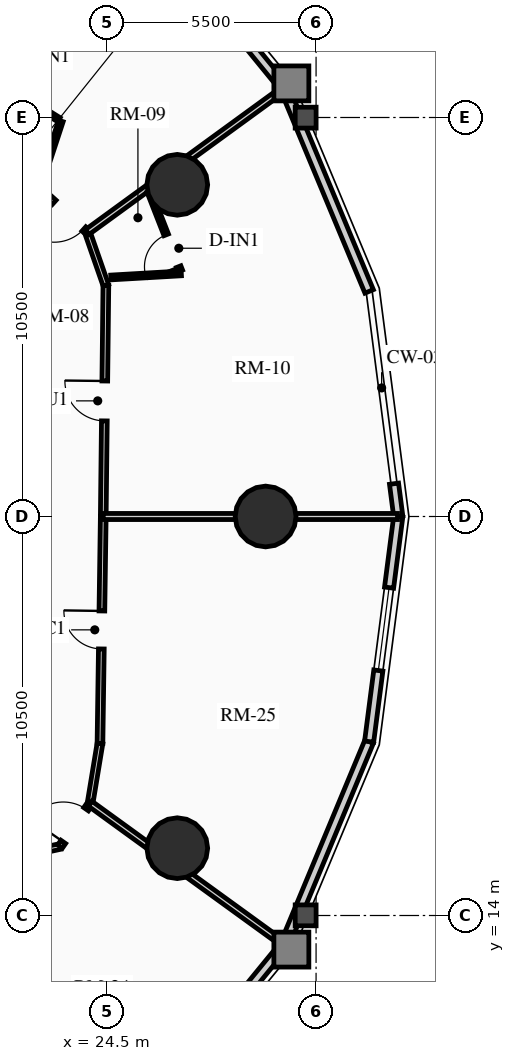
"""IFC4 building model, lengths in metres.
Left out: names, types, materials, properties, quantities, classifications, styles, units other than length and angle.
Written with IfcOpenShell. Run it as: python <this file> out.ifc"""

import sys

from ifc_helpers import new_model, si_unit, direction, frame, frame_2d, origin, origin_2d, place, context, subcontext, project, spatial, rectangle, circle, extrude, source, transform, mapped, element, fill, save


model = new_model("IFC4")
c1 = context("Model", 3, precision=1e-05, world=origin(), true_north=direction((0.0, 1.0)))
c2 = subcontext(c1, "Body", "Model", "MODEL_VIEW")
j1 = project(units=[si_unit("LENGTHUNIT", "METRE"), si_unit("PLANEANGLEUNIT", "RADIAN")], contexts=[c1])
p1 = place(None, origin())
s1 = spatial("IfcSite", under=j1, at=p1, CompositionType="ELEMENT")
p2 = place(p1, origin())
s2 = spatial("IfcBuilding", under=s1, at=p2, CompositionType="ELEMENT")
p3 = place(p2, frame((0.0, 0.0, 48.19)))
s3 = spatial("IfcBuildingStorey", under=s2, at=p3, CompositionType="ELEMENT", Elevation=48.19)
for number, where, z_axis, x_axis in (
    (1, (28.672, 24.5, 0.0), (0.0, 0.0, 1.0), (1.0, 0.0, 0.0)),
    (2, (26.347, 33.229, 0.0), (0.0, 0.0, 1.0), (1.0, 0.0, 0.0)),
    (3, (26.347, 15.771, 0.0), (0.0, 0.0, 1.0), (1.0, 0.0, 0.0)),
):
    element("IfcColumn", number, at=place(p3, frame(where, z_axis=z_axis, x_axis=x_axis)), inside=s3, PredefinedType="USERDEFINED", context=c2, shape_type="SweptSolid", body=[
        extrude(circle(Radius=0.8, at=origin_2d()), origin(), (0.0, 0.0, 1.0), 2.91),
    ])
p4 = place(p3, frame((32.051, 25.363, 0.0), z_axis=(0.0, 0.0, 1.0), x_axis=(0.128523364007, -0.991706481225, 0.0)))
e4 = element("IfcWall", 4, at=p4, inside=s3, PredefinedType="SOLIDWALL", context=c2, shape_type="SweptSolid", body=[
    extrude(rectangle(XDim=0.87, YDim=0.24, at=frame_2d((0.435, 0.0))), origin(), (0.0, 0.0, 1.0), 2.635),
])
p5 = place(p3, frame((29.172, 35.768, 0.0), z_axis=(0.0, 0.0, 1.0), x_axis=(0.384348836956, -0.923187939442, 0.0)))
e5 = element("IfcWall", 5, at=p5, inside=s3, PredefinedType="SOLIDWALL", context=c2, shape_type="SweptSolid", body=[
    extrude(rectangle(XDim=5.789, YDim=0.24, at=frame_2d((2.894, 0.0))), origin(), (0.0, 0.0, 1.0), 2.073),
])
p6 = place(p3, frame((25.707, 40.009, 0.0), z_axis=(0.0, 0.0, 1.0), x_axis=(0.632713287022, -0.77438614168, 0.0)))
e6 = element("IfcWall", 6, at=p6, inside=s3, PredefinedType="SOLIDWALL", context=c2, shape_type="SweptSolid", body=[
    extrude(rectangle(XDim=5.477, YDim=0.24, at=frame_2d((2.738, 0.0))), origin(), (0.0, 0.0, 1.0), 2.073),
])
m1 = source(origin(), c2, "Body", "SweptSolid", [
    extrude(rectangle(XDim=1.9, YDim=1.35, at=frame_2d((0.95, 0.675))), frame((0.0, 0.13, 0.0), z_axis=(0.0, -1.0, 0.0), x_axis=(1.0, 0.0, 0.0)), (0.0, 0.0, 1.0), 0.26),
])
p7 = place(p6, frame((1.788, 0.0, 0.65)))
e7 = element("IfcOpeningElement", 7, at=p7, cuts=e6, PredefinedType="OPENING", context=c2, shape_type="MappedRepresentation", body=[
    mapped(m1, transform((0.0, 0.0, 0.0), x_axis=(1.0, 0.0, 0.0), y_axis=(0.0, 1.0, 0.0), z_axis=(0.0, 0.0, 1.0), scale=1.0)),
])
p8 = place(p3, frame((29.172, 13.232, 0.0), z_axis=(0.0, 0.0, 1.0), x_axis=(-0.632713287022, -0.77438614168, 0.0)))
e8 = element("IfcWall", 8, at=p8, inside=s3, PredefinedType="SOLIDWALL", context=c2, shape_type="SweptSolid", body=[
    extrude(rectangle(XDim=5.477, YDim=0.24, at=frame_2d((2.738, 0.0))), origin(), (0.0, 0.0, 1.0), 2.073),
])
p9 = place(p8, frame((1.788, 0.0, 0.65)))
e9 = element("IfcOpeningElement", 9, at=p9, cuts=e8, PredefinedType="OPENING", context=c2, shape_type="MappedRepresentation", body=[
    mapped(m1, transform((0.0, 0.0, 0.0), x_axis=(1.0, 0.0, 0.0), y_axis=(0.0, 1.0, 0.0), z_axis=(0.0, 0.0, 1.0), scale=1.0)),
])
p10 = place(p3, frame((31.396, 18.576, 0.0), z_axis=(0.0, 0.0, 1.0), x_axis=(-0.384348836956, -0.923187939442, 0.0)))
e10 = element("IfcWall", 10, at=p10, inside=s3, PredefinedType="SOLIDWALL", context=c2, shape_type="SweptSolid", body=[
    extrude(rectangle(XDim=5.789, YDim=0.24, at=frame_2d((2.894, 0.0))), origin(), (0.0, 0.0, 1.0), 2.073),
])
p11 = place(p3, frame((32.163, 24.5, 0.0), z_axis=(0.0, 0.0, 1.0), x_axis=(-0.128339641463, -0.991730274031, 0.0)))
e11 = element("IfcWall", 11, at=p11, inside=s3, PredefinedType="SOLIDWALL", context=c2, shape_type="SweptSolid", body=[
    extrude(rectangle(XDim=5.973, YDim=0.24, at=frame_2d((2.987, 0.0))), origin(), (0.0, 0.0, 1.0), 2.073),
])
m2 = source(origin(), c2, "Body", "SweptSolid", [
    extrude(rectangle(XDim=2.2, YDim=1.35, at=frame_2d((1.1, 0.675))), frame((0.0, 0.13, 0.0), z_axis=(0.0, -1.0, 0.0), x_axis=(1.0, 0.0, 0.0)), (0.0, 0.0, 1.0), 0.26),
])
p12 = place(p11, frame((1.887, 0.0, 0.65)))
e12 = element("IfcOpeningElement", 12, at=p12, cuts=e11, PredefinedType="OPENING", context=c2, shape_type="MappedRepresentation", body=[
    mapped(m2, transform((0.0, 0.0, 0.0), x_axis=(1.0, 0.0, 0.0), y_axis=(0.0, 1.0, 0.0), z_axis=(0.0, 0.0, 1.0), scale=1.0)),
])
p13 = place(p3, frame((24.4, 24.5, 0.0), z_axis=(0.0, 0.0, 1.0), x_axis=(0.011359710161, 0.999935476411, 0.0)))
e13 = element("IfcWall", 13, at=p13, inside=s3, PredefinedType="PARTITIONING", context=c2, shape_type="SweptSolid", body=[
    extrude(rectangle(XDim=6.082, YDim=0.15, at=frame_2d((3.041, 0.0))), origin(), (0.0, 0.0, 1.0), 2.159),
])
m3 = source(origin(), c2, "Body", "SweptSolid", [
    extrude(rectangle(XDim=1.05, YDim=2.015, at=frame_2d((0.525, 1.007))), frame((0.0, 0.085, 0.0), z_axis=(0.0, -1.0, 0.0), x_axis=(1.0, 0.0, 0.0)), (0.0, 0.0, 1.0), 0.17),
])
p14 = place(p13, frame((2.516, 0.0, 0.0)))
e14 = element("IfcOpeningElement", 14, at=p14, cuts=e13, PredefinedType="OPENING", context=c2, shape_type="MappedRepresentation", body=[
    mapped(m3, transform((0.0, 0.0, 0.0), x_axis=(1.0, 0.0, 0.0), y_axis=(0.0, 1.0, 0.0), z_axis=(0.0, 0.0, 1.0), scale=1.0)),
])
p15 = place(p3, frame((24.469, 30.582, 0.0), z_axis=(0.0, 0.0, 1.0), x_axis=(-0.328902536986, 0.944363871166, 0.0)))
e15 = element("IfcWall", 15, at=p15, inside=s3, PredefinedType="PARTITIONING", context=c2, shape_type="SweptSolid", body=[
    extrude(rectangle(XDim=1.488, YDim=0.15, at=frame_2d((0.744, 0.0))), origin(), (0.0, 0.0, 1.0), 2.205),
])
p16 = place(p3, frame((23.98, 31.987, 0.0), z_axis=(0.0, 0.0, 1.0), x_axis=(-0.744317922268, 0.667825449193, 0.0)))
e16 = element("IfcWall", 16, at=p16, inside=s3, PredefinedType="PARTITIONING", context=c2, shape_type="SweptSolid", body=[
    extrude(rectangle(XDim=1.481, YDim=0.15, at=frame_2d((0.74, 0.0))), origin(), (0.0, 0.0, 1.0), 2.159),
])
p17 = place(p16, frame((0.12, 0.0, 0.0)))
e17 = element("IfcOpeningElement", 17, at=p17, cuts=e16, PredefinedType="OPENING", context=c2, shape_type="MappedRepresentation", body=[
    mapped(m3, transform((0.0, 0.0, 0.0), x_axis=(1.0, 0.0, 0.0), y_axis=(0.0, 1.0, 0.0), z_axis=(0.0, 0.0, 1.0), scale=1.0)),
])
p18 = place(p3, frame((21.419, 15.418, 0.0), z_axis=(0.0, 0.0, 1.0), x_axis=(0.977540384091, 0.210748184977, 0.0)))
e18 = element("IfcWall", 18, at=p18, inside=s3, PredefinedType="PARTITIONING", context=c2, shape_type="SweptSolid", body=[
    extrude(rectangle(XDim=1.887, YDim=0.15, at=frame_2d((0.944, 0.0))), origin(), (0.0, 0.0, 1.0), 2.205),
])
p19 = place(p3, frame((23.263, 15.816, 0.0), z_axis=(0.0, 0.0, 1.0), x_axis=(0.572652947117, 0.819797903241, 0.0)))
e19 = element("IfcWall", 19, at=p19, inside=s3, PredefinedType="PARTITIONING", context=c2, shape_type="SweptSolid", body=[
    extrude(rectangle(XDim=1.377, YDim=0.15, at=frame_2d((0.688, 0.0))), origin(), (0.0, 0.0, 1.0), 2.159),
])
p20 = place(p19, frame((0.147, 0.0, 0.0)))
e20 = element("IfcOpeningElement", 20, at=p20, cuts=e19, PredefinedType="OPENING", context=c2, shape_type="MappedRepresentation", body=[
    mapped(m3, transform((0.0, 0.0, 0.0), x_axis=(1.0, 0.0, 0.0), y_axis=(0.0, 1.0, 0.0), z_axis=(0.0, 0.0, 1.0), scale=1.0)),
])
p21 = place(p3, frame((24.052, 16.945, 0.0), z_axis=(0.0, 0.0, 1.0), x_axis=(0.162869842843, 0.986647563364, 0.0)))
e21 = element("IfcWall", 21, at=p21, inside=s3, PredefinedType="PARTITIONING", context=c2, shape_type="SweptSolid", body=[
    extrude(rectangle(XDim=1.605, YDim=0.15, at=frame_2d((0.803, 0.0))), origin(), (0.0, 0.0, 1.0), 2.205),
])
p22 = place(p3, frame((24.313, 18.529, 0.0), z_axis=(0.0, 0.0, 1.0), x_axis=(0.014472275982, 0.99989527113, 0.0)))
e22 = element("IfcWall", 22, at=p22, inside=s3, PredefinedType="PARTITIONING", context=c2, shape_type="SweptSolid", body=[
    extrude(rectangle(XDim=5.972, YDim=0.15, at=frame_2d((2.986, 0.0))), origin(), (0.0, 0.0, 1.0), 2.635),
])
m4 = source(origin(), c2, "Body", "SweptSolid", [
    extrude(rectangle(XDim=1.0, YDim=2.015, at=frame_2d((0.5, 1.007))), frame((0.0, 0.085, 0.0), z_axis=(0.0, -1.0, 0.0), x_axis=(1.0, 0.0, 0.0)), (0.0, 0.0, 1.0), 0.17),
])
p23 = place(p22, frame((2.486, 0.0, 0.0)))
e23 = element("IfcOpeningElement", 23, at=p23, cuts=e22, PredefinedType="OPENING", context=c2, shape_type="MappedRepresentation", body=[
    mapped(m4, transform((0.0, 0.0, 0.0), x_axis=(1.0, 0.0, 0.0), y_axis=(0.0, 1.0, 0.0), z_axis=(0.0, 0.0, 1.0), scale=1.0)),
])
p24 = place(p3, frame((24.4, 24.5, 0.0), z_axis=(0.0, 0.0, 1.0), x_axis=(1.0, 0.0, 0.0)))
e24 = element("IfcWall", 24, at=p24, inside=s3, PredefinedType="PARTITIONING", context=c2, shape_type="SweptSolid", body=[
    extrude(rectangle(XDim=7.743, YDim=0.16, at=frame_2d((3.872, 0.0))), origin(), (0.0, 0.0, 1.0), 2.073),
])
p25 = place(p3, frame((23.98, 31.987, 0.0), z_axis=(0.0, 0.0, 1.0), x_axis=(0.80834018144, 0.588715679313, 0.0)))
e25 = element("IfcWall", 25, at=p25, inside=s3, PredefinedType="PARTITIONING", context=c2, shape_type="SweptSolid", body=[
    extrude(rectangle(XDim=6.403, YDim=0.16, at=frame_2d((3.202, 0.0))), origin(), (0.0, 0.0, 1.0), 2.073),
])
p26 = place(p3, frame((24.052, 16.945, 0.0), z_axis=(0.0, 0.0, 1.0), x_axis=(0.809544185493, -0.587058950817, 0.0)))
e26 = element("IfcWall", 26, at=p26, inside=s3, PredefinedType="PARTITIONING", context=c2, shape_type="SweptSolid", body=[
    extrude(rectangle(XDim=6.304, YDim=0.16, at=frame_2d((3.152, 0.0))), origin(), (0.0, 0.0, 1.0), 2.073),
])
p27 = place(p3, frame((24.601, 30.79, 0.0), z_axis=(0.0, 0.0, 1.0), x_axis=(0.998323904123, 0.057873849514, 0.0)))
e27 = element("IfcWall", 27, at=p27, inside=s3, PredefinedType="PARTITIONING", context=c2, shape_type="SweptSolid", body=[
    extrude(rectangle(XDim=1.856, YDim=0.125, at=frame_2d((0.928, 0.0))), origin(), (0.0, 0.0, 1.0), 2.205),
])
p28 = place(p3, frame((26.428, 30.963, 0.0), z_axis=(0.0, 0.0, 1.0), x_axis=(-0.364149471566, 0.931340519014, 0.0)))
e28 = element("IfcWall", 28, at=p28, inside=s3, PredefinedType="PARTITIONING", context=c2, shape_type="SweptSolid", body=[
    extrude(rectangle(XDim=2.247, YDim=0.125, at=frame_2d((1.124, 0.0))), origin(), (0.0, 0.0, 1.0), 2.159),
])
m5 = source(origin(), c2, "Body", "SweptSolid", [
    extrude(rectangle(XDim=0.9, YDim=2.005, at=frame_2d((0.45, 1.002))), frame((0.0, 0.073, 0.0), z_axis=(0.0, -1.0, 0.0), x_axis=(1.0, 0.0, 0.0)), (0.0, 0.0, 1.0), 0.145),
])
p29 = place(p28, frame((0.12, 0.0, 0.0)))
e29 = element("IfcOpeningElement", 29, at=p29, cuts=e28, PredefinedType="OPENING", context=c2, shape_type="MappedRepresentation", body=[
    mapped(m5, transform((0.0, 0.0, 0.0), x_axis=(1.0, 0.0, 0.0), y_axis=(0.0, 1.0, 0.0), z_axis=(0.0, 0.0, 1.0), scale=1.0)),
])
p30 = place(p3, frame((22.76, 33.313, 0.0), z_axis=(0.0, 0.0, 1.0), x_axis=(0.312649886595, 0.949868437423, 0.0)))
e30 = element("IfcWall", 30, at=p30, inside=s3, PredefinedType="PARTITIONING", context=c2, shape_type="SweptSolid", body=[
    extrude(rectangle(XDim=1.68, YDim=0.125, at=frame_2d((0.84, 0.0))), origin(), (0.0, 0.0, 1.0), 2.205),
])
p31 = place(p3, frame((23.233, 34.941, 0.0), z_axis=(0.0, 0.0, 1.0), x_axis=(-0.84760373009, 0.53062973601, 0.0)))
e31 = element("IfcWall", 31, at=p31, inside=s3, PredefinedType="PARTITIONING", context=c2, shape_type="SweptSolid", body=[
    extrude(rectangle(XDim=1.983, YDim=0.125, at=frame_2d((0.991, 0.0))), origin(), (0.0, 0.0, 1.0), 2.635),
])
p32 = place(p31, frame((0.436, 0.0, 0.0)))
e32 = element("IfcOpeningElement", 32, at=p32, cuts=e31, PredefinedType="OPENING", context=c2, shape_type="MappedRepresentation", body=[
    mapped(m5, transform((0.0, 0.0, 0.0), x_axis=(1.0, 0.0, 0.0), y_axis=(0.0, 1.0, 0.0), z_axis=(0.0, 0.0, 1.0), scale=1.0)),
])
m6 = source(origin(), c2, "Body", "SweptSolid", [
    extrude(rectangle(XDim=2.2, YDim=1.35, at=frame_2d((1.1, 0.675))), frame((0.0, 0.03, 0.0), z_axis=(0.0, -1.0, 0.0), x_axis=(1.0, 0.0, 0.0)), (0.0, 0.0, 1.0), 0.06),
])
p33 = place(p12, origin())
e33 = element("IfcWindow", 33, at=p33, inside=s3, PartitioningType="DOUBLE_PANEL_VERTICAL", PredefinedType="WINDOW", context=c2, shape_type="MappedRepresentation", body=[
    mapped(m6, transform((0.0, 0.0, 0.0), x_axis=(1.0, 0.0, 0.0), y_axis=(0.0, 1.0, 0.0), z_axis=(0.0, 0.0, 1.0), scale=1.0)),
])
fill(e12, e33)
m7 = source(origin(), c2, "Body", "SweptSolid", [
    extrude(rectangle(XDim=1.05, YDim=2.015, at=frame_2d((0.525, 1.007))), frame((0.0, 0.025, 0.0), z_axis=(0.0, -1.0, 0.0), x_axis=(1.0, 0.0, 0.0)), (0.0, 0.0, 1.0), 0.05),
])
p34 = place(p14, origin())
e34 = element("IfcDoor", 34, at=p34, inside=s3, OperationType="SINGLE_SWING_RIGHT", PredefinedType="DOOR", context=c2, shape_type="MappedRepresentation", body=[
    mapped(m7, transform((0.0, 0.0, 0.0), x_axis=(1.0, 0.0, 0.0), y_axis=(0.0, 1.0, 0.0), z_axis=(0.0, 0.0, 1.0), scale=1.0)),
])
fill(e14, e34)
m8 = source(origin(), c2, "Body", "SweptSolid", [
    extrude(rectangle(XDim=0.9, YDim=2.005, at=frame_2d((0.45, 1.002))), frame((0.0, 0.025, 0.0), z_axis=(0.0, -1.0, 0.0), x_axis=(1.0, 0.0, 0.0)), (0.0, 0.0, 1.0), 0.05),
])
p35 = place(p29, origin())
e35 = element("IfcDoor", 35, at=p35, inside=s3, OperationType="SINGLE_SWING_LEFT", PredefinedType="DOOR", context=c2, shape_type="MappedRepresentation", body=[
    mapped(m8, transform((0.0, 0.0, 0.0), x_axis=(1.0, 0.0, 0.0), y_axis=(0.0, 1.0, 0.0), z_axis=(0.0, 0.0, 1.0), scale=1.0)),
])
fill(e29, e35)
p36 = place(p17, origin())
e36 = element("IfcDoor", 36, at=p36, inside=s3, OperationType="SINGLE_SWING_RIGHT", PredefinedType="DOOR", context=c2, shape_type="MappedRepresentation", body=[
    mapped(m7, transform((0.0, 0.0, 0.0), x_axis=(1.0, 0.0, 0.0), y_axis=(0.0, 1.0, 0.0), z_axis=(0.0, 0.0, 1.0), scale=1.0)),
])
fill(e17, e36)
p37 = place(p20, origin())
e37 = element("IfcDoor", 37, at=p37, inside=s3, OperationType="SINGLE_SWING_LEFT", PredefinedType="DOOR", context=c2, shape_type="MappedRepresentation", body=[
    mapped(m7, transform((0.0, 0.0, 0.0), x_axis=(1.0, 0.0, 0.0), y_axis=(0.0, 1.0, 0.0), z_axis=(0.0, 0.0, 1.0), scale=1.0)),
])
fill(e20, e37)
m9 = source(origin(), c2, "Body", "SweptSolid", [
    extrude(rectangle(XDim=1.0, YDim=2.015, at=frame_2d((0.5, 1.007))), frame((0.0, 0.025, 0.0), z_axis=(0.0, -1.0, 0.0), x_axis=(1.0, 0.0, 0.0)), (0.0, 0.0, 1.0), 0.05),
])
p38 = place(p23, origin())
e38 = element("IfcDoor", 38, at=p38, inside=s3, OperationType="SINGLE_SWING_RIGHT", PredefinedType="DOOR", context=c2, shape_type="MappedRepresentation", body=[
    mapped(m9, transform((0.0, 0.0, 0.0), x_axis=(1.0, 0.0, 0.0), y_axis=(0.0, 1.0, 0.0), z_axis=(0.0, 0.0, 1.0), scale=1.0)),
])
fill(e23, e38)
save(model, sys.argv[1])
